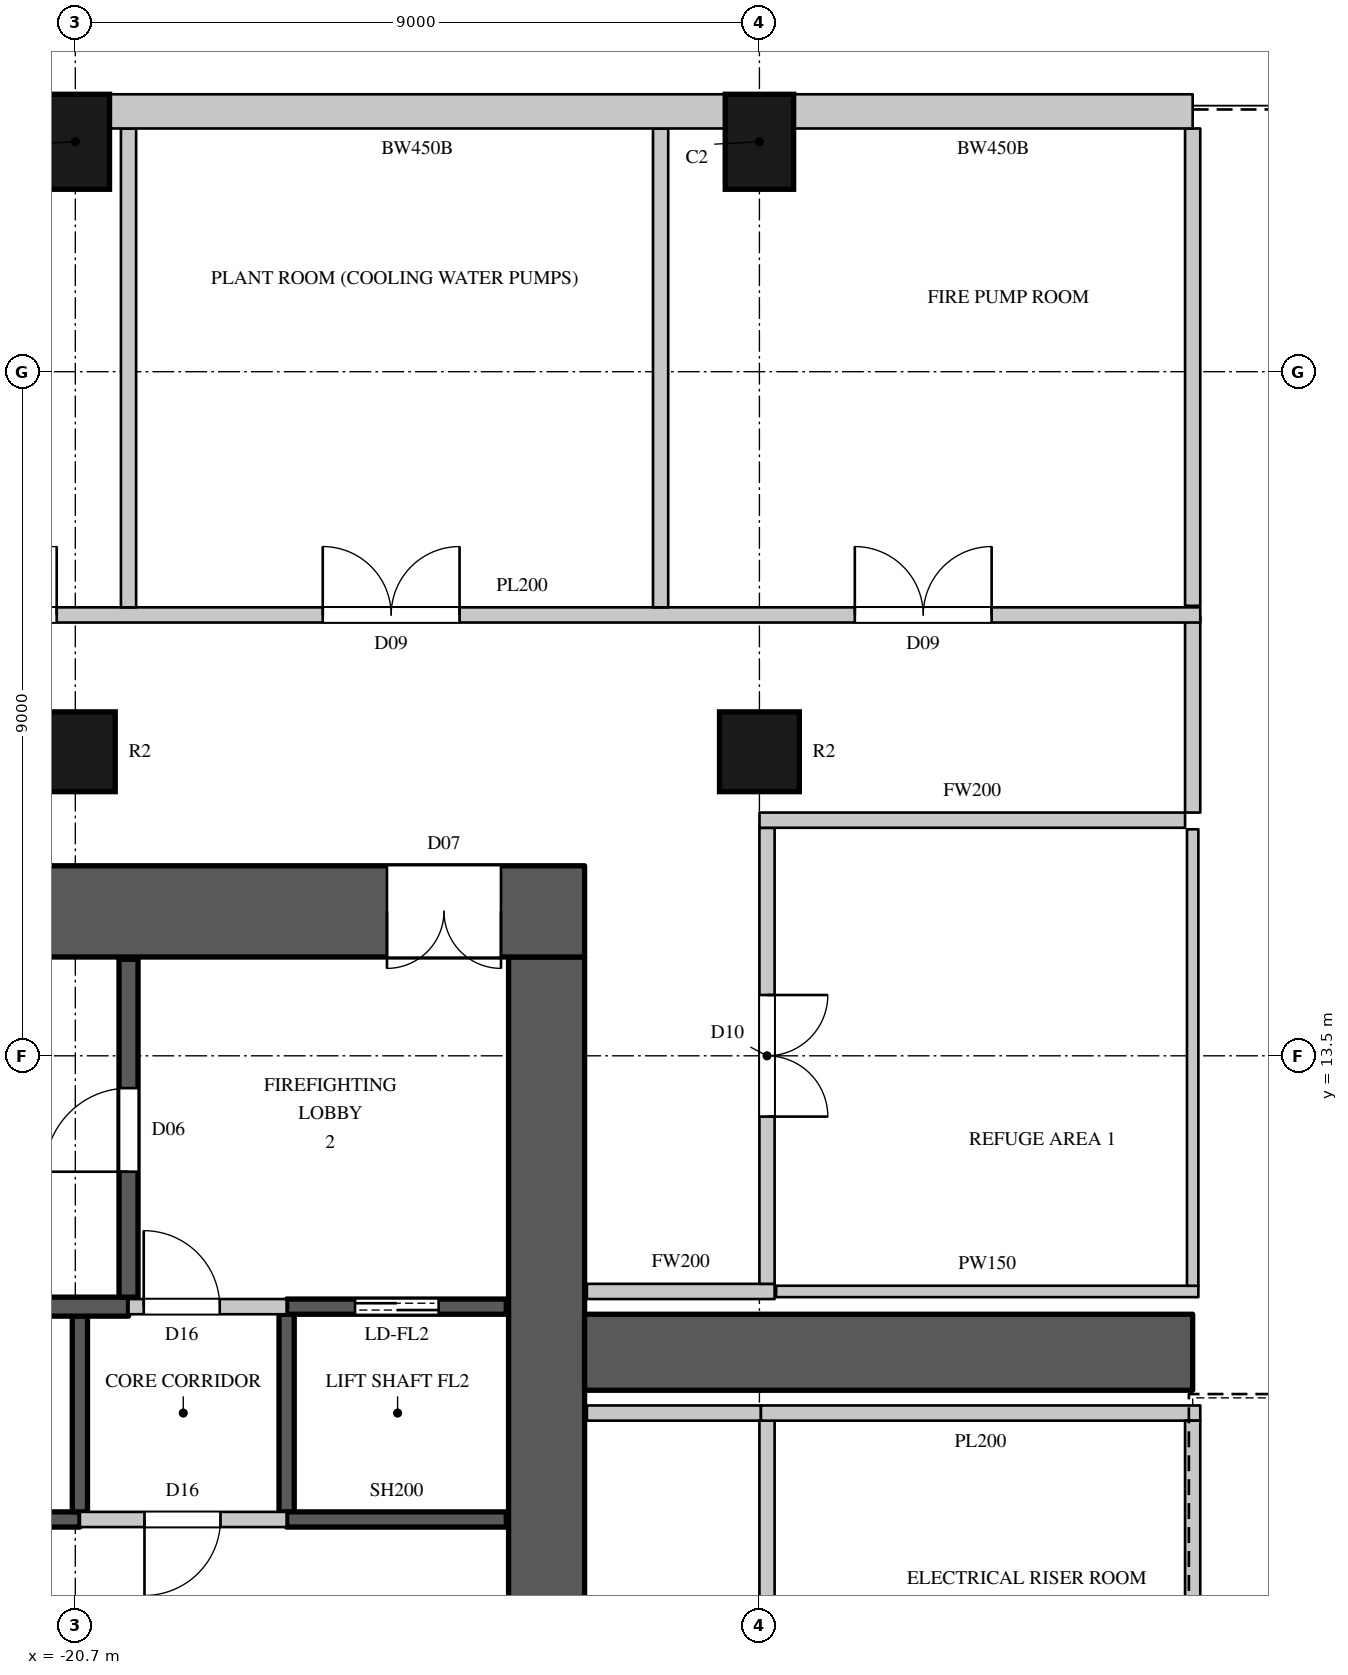
"""IFC4 building model, lengths in metres.
Left out: names, types, materials, properties, quantities, classifications, styles, units other than length and angle.
Written with IfcOpenShell. Run it as: python <this file> out.ifc"""

import sys

from ifc_helpers import new_model, si_unit, direction, frame, frame_2d, origin, origin_2d, place, context, subcontext, project, spatial, rectangle, circle, extrude, element, fill, save


model = new_model("IFC4")
c1 = context("Model", 3, precision=1e-05, world=origin(), true_north=direction((0.0, 1.0)))
c2 = subcontext(c1, "Body", "Model", "MODEL_VIEW")
j1 = project(units=[si_unit("LENGTHUNIT", "METRE"), si_unit("PLANEANGLEUNIT", "RADIAN")], contexts=[c1])
p1 = place(None, origin())
s1 = spatial("IfcSite", under=j1, at=p1, CompositionType="ELEMENT")
p2 = place(p1, origin())
s2 = spatial("IfcBuilding", under=s1, at=p2, CompositionType="ELEMENT")
p3 = place(p2, frame((0.0, 0.0, 152.5)))
s3 = spatial("IfcBuildingStorey", under=s2, at=p3, CompositionType="ELEMENT", Elevation=152.5)
for number, where, z_axis, x_axis in (
    (1, (-11.7, 25.525, 0.0), (0.0, 0.0, 1.0), (-1.0, 0.0, 0.0)),
    (2, (-20.7, 25.525, 0.0), (0.0, 0.0, 1.0), (-1.0, 0.0, 0.0)),
):
    element("IfcColumn", number, at=place(p3, frame(where, z_axis=z_axis, x_axis=x_axis)), inside=s3, PredefinedType="COLUMN", context=c2, shape_type="SweptSolid", body=[
        extrude(rectangle(XDim=0.9, YDim=1.25, at=origin_2d()), origin(), (0.0, 0.0, 1.0), 8.0),
    ])
for number, where, z_axis, x_axis in (
    (3, (-20.7, 17.5, 0.0), (0.0, 0.0, 1.0), (1.0, 0.0, 0.0)),
    (4, (-11.7, 17.5, 0.0), (0.0, 0.0, 1.0), (1.0, 0.0, 0.0)),
):
    element("IfcColumn", number, at=place(p3, frame(where, z_axis=z_axis, x_axis=x_axis)), inside=s3, PredefinedType="COLUMN", context=c2, shape_type="SweptSolid", body=[
        extrude(circle(Radius=0.525, at=origin_2d()), origin(), (0.0, 0.0, 1.0), 8.0),
    ])
p4 = place(p3, frame((-14.0, 9.6, 0.0), z_axis=(0.0, 0.0, 1.0), x_axis=(1.0, 0.0, 0.0)))
e5 = element("IfcWall", 5, at=p4, inside=s3, PredefinedType="SOLIDWALL", context=c2, shape_type="SweptSolid", body=[
    extrude(rectangle(XDim=8.0, YDim=1.0, at=frame_2d((4.0, 0.0))), origin(), (0.0, 0.0, 1.0), 7.7),
])
p5 = place(p3, frame((-6.0, 25.925, 0.0), z_axis=(0.0, 0.0, 1.0), x_axis=(-1.0, 0.0, 0.0)))
e6 = element("IfcWall", 6, at=p5, inside=s3, PredefinedType="SOLIDWALL", context=c2, shape_type="SweptSolid", body=[
    extrude(rectangle(XDim=5.25, YDim=0.45, at=frame_2d((2.625, 0.0))), origin(), (0.0, 0.0, 1.0), 4.7),
])
p6 = place(p3, frame((-12.15, 25.925, 0.0), z_axis=(0.0, 0.0, 1.0), x_axis=(-1.0, 0.0, 0.0)))
e7 = element("IfcWall", 7, at=p6, inside=s3, PredefinedType="SOLIDWALL", context=c2, shape_type="SweptSolid", body=[
    extrude(rectangle(XDim=8.1, YDim=0.45, at=frame_2d((4.05, 0.0))), origin(), (0.0, 0.0, 1.0), 7.7),
])
p7 = place(p3, frame((-30.0, 15.4, 0.0), z_axis=(0.0, 0.0, 1.0), x_axis=(1.0, 0.0, 0.0)))
e8 = element("IfcWall", 8, at=p7, inside=s3, PredefinedType="SHEAR", context=c2, shape_type="SweptSolid", body=[
    extrude(rectangle(XDim=16.0, YDim=1.2, at=frame_2d((8.0, 0.0))), origin(), (0.0, 0.0, 1.0), 8.0),
])
p8 = place(p7, frame((13.4, 0.0, 0.0)))
e9 = element("IfcOpeningElement", 9, at=p8, cuts=e8, PredefinedType="OPENING", context=c2, shape_type="SweptSolid", body=[
    extrude(rectangle(XDim=1.5, YDim=2.4, at=frame_2d((0.75, 1.2))), frame((0.0, 0.61, 0.0), z_axis=(0.0, -1.0, 0.0), x_axis=(1.0, 0.0, 0.0)), (0.0, 0.0, 1.0), 1.22),
])
p9 = place(p3, frame((-14.5, -14.8, 0.0), z_axis=(0.0, 0.0, 1.0), x_axis=(0.0, 1.0, 0.0)))
e10 = element("IfcWall", 10, at=p9, inside=s3, PredefinedType="SHEAR", context=c2, shape_type="SweptSolid", body=[
    extrude(rectangle(XDim=29.6, YDim=1.0, at=frame_2d((14.8, 0.0))), origin(), (0.0, 0.0, 1.0), 8.0),
])
p10 = place(p9, frame((8.45, 0.0, 0.0)))
e11 = element("IfcOpeningElement", 11, at=p10, cuts=e10, PredefinedType="OPENING", context=c2, shape_type="SweptSolid", body=[
    extrude(rectangle(XDim=1.5, YDim=2.4, at=frame_2d((0.75, 1.2))), frame((0.0, 0.51, 0.0), z_axis=(0.0, -1.0, 0.0), x_axis=(1.0, 0.0, 0.0)), (0.0, 0.0, 1.0), 1.02),
])
p11 = place(p9, frame((19.65, 0.0, 0.0)))
e12 = element("IfcOpeningElement", 12, at=p11, cuts=e10, PredefinedType="OPENING", context=c2, shape_type="SweptSolid", body=[
    extrude(rectangle(XDim=1.5, YDim=2.4, at=frame_2d((0.75, 1.2))), frame((0.0, 0.51, 0.0), z_axis=(0.0, -1.0, 0.0), x_axis=(1.0, 0.0, 0.0)), (0.0, 0.0, 1.0), 1.02),
])
p12 = place(p9, frame((14.5, 0.0, 0.0)))
e13 = element("IfcOpeningElement", 13, at=p12, cuts=e10, PredefinedType="OPENING", context=c2, shape_type="SweptSolid", body=[
    extrude(rectangle(XDim=0.6, YDim=2.0, at=frame_2d((0.3, 1.0))), frame((0.0, 0.51, 0.0), z_axis=(0.0, -1.0, 0.0), x_axis=(1.0, 0.0, 0.0)), (0.0, 0.0, 1.0), 1.02),
])
p13 = place(p3, frame((-20.64, 7.4, 0.0), z_axis=(0.0, 0.0, 1.0), x_axis=(1.0, 0.0, 0.0)))
e14 = element("IfcWall", 14, at=p13, inside=s3, PredefinedType="PARTITIONING", context=c2, shape_type="SweptSolid", body=[
    extrude(rectangle(XDim=2.72, YDim=0.2, at=frame_2d((1.36, 0.0))), origin(), (0.0, 0.0, 1.0), 7.7),
])
p14 = place(p13, frame((0.85, 0.0, 0.0)))
e15 = element("IfcOpeningElement", 15, at=p14, cuts=e14, PredefinedType="OPENING", context=c2, shape_type="SweptSolid", body=[
    extrude(rectangle(XDim=1.0, YDim=2.2, at=frame_2d((0.5, 1.1))), frame((0.0, 0.11, 0.0), z_axis=(0.0, -1.0, 0.0), x_axis=(1.0, 0.0, 0.0)), (0.0, 0.0, 1.0), 0.22),
])
p15 = place(p3, frame((-20.0, 10.2, 0.0), z_axis=(0.0, 0.0, 1.0), x_axis=(1.0, 0.0, 0.0)))
e16 = element("IfcWall", 16, at=p15, inside=s3, PredefinedType="PARTITIONING", context=c2, shape_type="SweptSolid", body=[
    extrude(rectangle(XDim=2.08, YDim=0.2, at=frame_2d((1.04, 0.0))), origin(), (0.0, 0.0, 1.0), 7.7),
])
p16 = place(p15, frame((0.2, 0.0, 0.0)))
e17 = element("IfcOpeningElement", 17, at=p16, cuts=e16, PredefinedType="OPENING", context=c2, shape_type="SweptSolid", body=[
    extrude(rectangle(XDim=1.0, YDim=2.2, at=frame_2d((0.5, 1.1))), frame((0.0, 0.11, 0.0), z_axis=(0.0, -1.0, 0.0), x_axis=(1.0, 0.0, 0.0)), (0.0, 0.0, 1.0), 0.22),
])
p17 = place(p3, frame((-13.97, 8.8, 0.0), z_axis=(0.0, 0.0, 1.0), x_axis=(1.0, 0.0, 0.0)))
e18 = element("IfcWall", 18, at=p17, inside=s3, PredefinedType="PARTITIONING", context=c2, shape_type="SweptSolid", body=[
    extrude(rectangle(XDim=2.29, YDim=0.2, at=frame_2d((1.145, 0.0))), origin(), (0.0, 0.0, 1.0), 7.7),
])
p18 = place(p3, frame((-13.97, 10.4, 0.0), z_axis=(0.0, 0.0, 1.0), x_axis=(1.0, 0.0, 0.0)))
e19 = element("IfcWall", 19, at=p18, inside=s3, PredefinedType="PARTITIONING", context=c2, shape_type="SweptSolid", body=[
    extrude(rectangle(XDim=2.47, YDim=0.2, at=frame_2d((1.235, 0.0))), origin(), (0.0, 0.0, 1.0), 7.7),
])
p19 = place(p3, frame((-11.6, 10.5, 0.0), z_axis=(0.0, 0.0, 1.0), x_axis=(0.0, 1.0, 0.0)))
e20 = element("IfcWall", 20, at=p19, inside=s3, PredefinedType="PARTITIONING", context=c2, shape_type="SweptSolid", body=[
    extrude(rectangle(XDim=5.999, YDim=0.2, at=frame_2d((3.0, 0.0))), origin(), (0.0, 0.0, 1.0), 7.15),
])
p20 = place(p19, frame((2.2, 0.0, 0.0)))
e21 = element("IfcOpeningElement", 21, at=p20, cuts=e20, PredefinedType="OPENING", context=c2, shape_type="SweptSolid", body=[
    extrude(rectangle(XDim=1.6, YDim=2.4, at=frame_2d((0.8, 1.2))), frame((0.0, 0.11, 0.0), z_axis=(0.0, -1.0, 0.0), x_axis=(1.0, 0.0, 0.0)), (0.0, 0.0, 1.0), 0.22),
])
p21 = place(p3, frame((-11.699, 16.6, 0.0), z_axis=(0.0, 0.0, 1.0), x_axis=(1.0, 0.0, 0.0)))
e22 = element("IfcWall", 22, at=p21, inside=s3, PredefinedType="PARTITIONING", context=c2, shape_type="SweptSolid", body=[
    extrude(rectangle(XDim=5.599, YDim=0.2, at=frame_2d((2.799, 0.0))), origin(), (0.0, 0.0, 1.0), 5.85),
])
p22 = place(p3, frame((-6.0, 16.7, 0.0), z_axis=(0.0, 0.0, 1.0), x_axis=(0.0, 1.0, 0.0)))
e23 = element("IfcWall", 23, at=p22, inside=s3, PredefinedType="PARTITIONING", context=c2, shape_type="SweptSolid", body=[
    extrude(rectangle(XDim=2.58, YDim=0.2, at=frame_2d((1.29, 0.0))), origin(), (0.0, 0.0, 1.0), 7.7),
])
p23 = place(p3, frame((-11.48, 10.4, 0.0), z_axis=(0.0, 0.0, 1.0), x_axis=(1.0, 0.0, 0.0)))
e24 = element("IfcWall", 24, at=p23, inside=s3, PredefinedType="PARTITIONING", context=c2, shape_type="SweptSolid", body=[
    extrude(rectangle(XDim=5.555, YDim=0.15, at=frame_2d((2.777, 0.0))), origin(), (0.0, 0.0, 1.0), 7.7),
])
p24 = place(p3, frame((-6.0, 10.475, 0.0), z_axis=(0.0, 0.0, 1.0), x_axis=(0.0, 1.0, 0.0)))
e25 = element("IfcWall", 25, at=p24, inside=s3, PredefinedType="PARTITIONING", context=c2, shape_type="SweptSolid", body=[
    extrude(rectangle(XDim=6.005, YDim=0.15, at=frame_2d((3.002, 0.0))), origin(), (0.0, 0.0, 1.0), 7.7),
])
p25 = place(p3, frame((-23.745, 19.3, 0.0), z_axis=(0.0, 0.0, 1.0), x_axis=(1.0, 0.0, 0.0)))
e26 = element("IfcWall", 26, at=p25, inside=s3, PredefinedType="PARTITIONING", context=c2, shape_type="SweptSolid", body=[
    extrude(rectangle(XDim=17.845, YDim=0.2, at=frame_2d((8.922, 0.0))), origin(), (0.0, 0.0, 1.0), 7.7),
])
p26 = place(p25, frame((1.0, 0.0, 0.0)))
e27 = element("IfcOpeningElement", 27, at=p26, cuts=e26, PredefinedType="OPENING", context=c2, shape_type="SweptSolid", body=[
    extrude(rectangle(XDim=1.8, YDim=2.4, at=frame_2d((0.9, 1.2))), frame((0.0, 0.11, 0.0), z_axis=(0.0, -1.0, 0.0), x_axis=(1.0, 0.0, 0.0)), (0.0, 0.0, 1.0), 0.22),
])
p27 = place(p25, frame((6.3, 0.0, 0.0)))
e28 = element("IfcOpeningElement", 28, at=p27, cuts=e26, PredefinedType="OPENING", context=c2, shape_type="SweptSolid", body=[
    extrude(rectangle(XDim=1.8, YDim=2.4, at=frame_2d((0.9, 1.2))), frame((0.0, 0.11, 0.0), z_axis=(0.0, -1.0, 0.0), x_axis=(1.0, 0.0, 0.0)), (0.0, 0.0, 1.0), 0.22),
])
p28 = place(p25, frame((13.3, 0.0, 0.0)))
e29 = element("IfcOpeningElement", 29, at=p28, cuts=e26, PredefinedType="OPENING", context=c2, shape_type="SweptSolid", body=[
    extrude(rectangle(XDim=1.8, YDim=2.4, at=frame_2d((0.9, 1.2))), frame((0.0, 0.11, 0.0), z_axis=(0.0, -1.0, 0.0), x_axis=(1.0, 0.0, 0.0)), (0.0, 0.0, 1.0), 0.22),
])
p29 = place(p3, frame((-20.0, 19.4, 0.0), z_axis=(0.0, 0.0, 1.0), x_axis=(0.0, 1.0, 0.0)))
e30 = element("IfcWall", 30, at=p29, inside=s3, PredefinedType="PARTITIONING", context=c2, shape_type="SweptSolid", body=[
    extrude(rectangle(XDim=6.3, YDim=0.2, at=frame_2d((3.15, 0.0))), origin(), (0.0, 0.0, 1.0), 6.4),
])
p30 = place(p3, frame((-13.0, 19.4, 0.0), z_axis=(0.0, 0.0, 1.0), x_axis=(0.0, 1.0, 0.0)))
e31 = element("IfcWall", 31, at=p30, inside=s3, PredefinedType="PARTITIONING", context=c2, shape_type="SweptSolid", body=[
    extrude(rectangle(XDim=6.3, YDim=0.2, at=frame_2d((3.15, 0.0))), origin(), (0.0, 0.0, 1.0), 7.7),
])
p31 = place(p3, frame((-11.6, -8.7, 0.0), z_axis=(0.0, 0.0, 1.0), x_axis=(0.0, 1.0, 0.0)))
e32 = element("IfcWall", 32, at=p31, inside=s3, PredefinedType="PARTITIONING", context=c2, shape_type="SweptSolid", body=[
    extrude(rectangle(XDim=17.4, YDim=0.2, at=frame_2d((8.7, 0.0))), origin(), (0.0, 0.0, 1.0), 7.15),
])
p32 = place(p31, frame((3.5, 0.0, 0.0)))
e33 = element("IfcOpeningElement", 33, at=p32, cuts=e32, PredefinedType="OPENING", context=c2, shape_type="SweptSolid", body=[
    extrude(rectangle(XDim=1.8, YDim=2.4, at=frame_2d((0.9, 1.2))), frame((0.0, 0.11, 0.0), z_axis=(0.0, -1.0, 0.0), x_axis=(1.0, 0.0, 0.0)), (0.0, 0.0, 1.0), 0.22),
])
p33 = place(p31, frame((12.05, 0.0, 0.0)))
e34 = element("IfcOpeningElement", 34, at=p33, cuts=e32, PredefinedType="OPENING", context=c2, shape_type="SweptSolid", body=[
    extrude(rectangle(XDim=1.8, YDim=2.4, at=frame_2d((0.9, 1.2))), frame((0.0, 0.11, 0.0), z_axis=(0.0, -1.0, 0.0), x_axis=(1.0, 0.0, 0.0)), (0.0, 0.0, 1.0), 0.22),
])
p34 = place(p3, frame((-11.68, 8.8, 0.0), z_axis=(0.0, 0.0, 1.0), x_axis=(1.0, 0.0, 0.0)))
e35 = element("IfcWall", 35, at=p34, inside=s3, PredefinedType="PARTITIONING", context=c2, shape_type="SweptSolid", body=[
    extrude(rectangle(XDim=5.78, YDim=0.2, at=frame_2d((2.89, 0.0))), origin(), (0.0, 0.0, 1.0), 7.7),
])
p35 = place(p3, frame((-6.0, 0.02, 0.0), z_axis=(0.0, 0.0, 1.0), x_axis=(0.0, 1.0, 0.0)))
e36 = element("IfcWall", 36, at=p35, inside=s3, PredefinedType="PARTITIONING", context=c2, shape_type="SweptSolid", body=[
    extrude(rectangle(XDim=8.68, YDim=0.2, at=frame_2d((4.34, 0.0))), origin(), (0.0, 0.0, 1.0), 7.7),
])
p36 = place(p3, frame((-6.0, 19.42, 0.0), z_axis=(0.0, 0.0, 1.0), x_axis=(0.0, 1.0, 0.0)))
e37 = element("IfcWall", 37, at=p36, inside=s3, PredefinedType="PARTITIONING", context=c2, shape_type="SweptSolid", body=[
    extrude(rectangle(XDim=6.28, YDim=0.2, at=frame_2d((3.14, 0.0))), origin(), (0.0, 0.0, 1.0), 7.7),
])
p37 = place(p3, frame((-28.97, 7.4, 0.0), z_axis=(0.0, 0.0, 1.0), x_axis=(1.0, 0.0, 0.0)))
e38 = element("IfcWall", 38, at=p37, inside=s3, PredefinedType="SHEAR", context=c2, shape_type="SweptSolid", body=[
    extrude(rectangle(XDim=8.33, YDim=0.2, at=frame_2d((4.165, 0.0))), origin(), (0.0, 0.0, 1.0), 7.7),
])
p38 = place(p3, frame((-20.64, 7.5, 0.0), z_axis=(0.0, 0.0, 1.0), x_axis=(0.0, 1.0, 0.0)))
e39 = element("IfcWall", 39, at=p38, inside=s3, PredefinedType="SHEAR", context=c2, shape_type="SweptSolid", body=[
    extrude(rectangle(XDim=2.575, YDim=0.2, at=frame_2d((1.288, 0.0))), origin(), (0.0, 0.0, 1.0), 7.7),
])
p39 = place(p3, frame((-17.92, 7.5, 0.0), z_axis=(0.0, 0.0, 1.0), x_axis=(0.0, 1.0, 0.0)))
e40 = element("IfcWall", 40, at=p39, inside=s3, PredefinedType="SHEAR", context=c2, shape_type="SweptSolid", body=[
    extrude(rectangle(XDim=2.6, YDim=0.2, at=frame_2d((1.3, 0.0))), origin(), (0.0, 0.0, 1.0), 7.7),
])
p40 = place(p3, frame((-17.92, 7.4, 0.0), z_axis=(0.0, 0.0, 1.0), x_axis=(1.0, 0.0, 0.0)))
e41 = element("IfcWall", 41, at=p40, inside=s3, PredefinedType="SHEAR", context=c2, shape_type="SweptSolid", body=[
    extrude(rectangle(XDim=2.89, YDim=0.2, at=frame_2d((1.445, 0.0))), origin(), (0.0, 0.0, 1.0), 7.7),
])
p41 = place(p3, frame((-17.92, 10.2, 0.0), z_axis=(0.0, 0.0, 1.0), x_axis=(1.0, 0.0, 0.0)))
e42 = element("IfcWall", 42, at=p41, inside=s3, PredefinedType="SHEAR", context=c2, shape_type="SweptSolid", body=[
    extrude(rectangle(XDim=2.89, YDim=0.2, at=frame_2d((1.445, 0.0))), origin(), (0.0, 0.0, 1.0), 7.7),
])
p42 = place(p41, frame((0.9, 0.0, 0.0)))
e43 = element("IfcOpeningElement", 43, at=p42, cuts=e42, PredefinedType="OPENING", context=c2, shape_type="SweptSolid", body=[
    extrude(rectangle(XDim=1.1, YDim=2.2, at=frame_2d((0.55, 1.1))), frame((0.0, 0.11, 0.0), z_axis=(0.0, -1.0, 0.0), x_axis=(1.0, 0.0, 0.0)), (0.0, 0.0, 1.0), 0.22),
])
p43 = place(p3, frame((-28.81, 10.2, 0.0), z_axis=(0.0, 0.0, 1.0), x_axis=(1.0, 0.0, 0.0)))
e44 = element("IfcWall", 44, at=p43, inside=s3, PredefinedType="SHEAR", context=c2, shape_type="SweptSolid", body=[
    extrude(rectangle(XDim=8.81, YDim=0.25, at=frame_2d((4.405, 0.0))), origin(), (0.0, 0.0, 1.0), 7.7),
])
p44 = place(p3, frame((-20.0, 10.325, 0.0), z_axis=(0.0, 0.0, 1.0), x_axis=(0.0, 1.0, 0.0)))
e45 = element("IfcWall", 45, at=p44, inside=s3, PredefinedType="SHEAR", context=c2, shape_type="SweptSolid", body=[
    extrude(rectangle(XDim=4.445, YDim=0.25, at=frame_2d((2.223, 0.0))), origin(), (0.0, 0.0, 1.0), 7.7),
])
p45 = place(p44, frame((1.65, 0.0, 0.0)))
e46 = element("IfcOpeningElement", 46, at=p45, cuts=e45, PredefinedType="OPENING", context=c2, shape_type="SweptSolid", body=[
    extrude(rectangle(XDim=1.1, YDim=2.2, at=frame_2d((0.55, 1.1))), frame((0.0, 0.135, 0.0), z_axis=(0.0, -1.0, 0.0), x_axis=(1.0, 0.0, 0.0)), (0.0, 0.0, 1.0), 0.27),
])
p46 = place(p45, origin())
e47 = element("IfcDoor", 47, at=p46, inside=s3, OperationType="SINGLE_SWING_LEFT", PredefinedType="DOOR", context=c2, shape_type="SweptSolid", body=[
    extrude(rectangle(XDim=1.1, YDim=2.2, at=frame_2d((0.55, 1.1))), frame((0.0, 0.025, 0.0), z_axis=(0.0, -1.0, 0.0), x_axis=(1.0, 0.0, 0.0)), (0.0, 0.0, 1.0), 0.05),
])
fill(e46, e47)
p47 = place(p14, origin())
e48 = element("IfcDoor", 48, at=p47, inside=s3, OperationType="SINGLE_SWING_RIGHT", PredefinedType="DOOR", context=c2, shape_type="SweptSolid", body=[
    extrude(rectangle(XDim=1.0, YDim=2.2, at=frame_2d((0.5, 1.1))), frame((0.0, 0.025, 0.0), z_axis=(0.0, -1.0, 0.0), x_axis=(1.0, 0.0, 0.0)), (0.0, 0.0, 1.0), 0.05),
])
fill(e15, e48)
p48 = place(p16, origin())
e49 = element("IfcDoor", 49, at=p48, inside=s3, OperationType="SINGLE_SWING_LEFT", PredefinedType="DOOR", context=c2, shape_type="SweptSolid", body=[
    extrude(rectangle(XDim=1.0, YDim=2.2, at=frame_2d((0.5, 1.1))), frame((0.0, 0.025, 0.0), z_axis=(0.0, -1.0, 0.0), x_axis=(1.0, 0.0, 0.0)), (0.0, 0.0, 1.0), 0.05),
])
fill(e17, e49)
p49 = place(p42, origin())
e50 = element("IfcDoor", 50, at=p49, inside=s3, OperationType="DOUBLE_DOOR_SLIDING", PredefinedType="DOOR", context=c2, shape_type="SweptSolid", body=[
    extrude(rectangle(XDim=1.1, YDim=2.2, at=frame_2d((0.55, 1.1))), frame((0.0, 0.025, 0.0), z_axis=(0.0, -1.0, 0.0), x_axis=(1.0, 0.0, 0.0)), (0.0, 0.0, 1.0), 0.05),
])
fill(e43, e50)
p50 = place(p26, origin())
e51 = element("IfcDoor", 51, at=p50, inside=s3, OperationType="DOUBLE_DOOR_SINGLE_SWING", PredefinedType="DOOR", context=c2, shape_type="SweptSolid", body=[
    extrude(rectangle(XDim=1.8, YDim=2.4, at=frame_2d((0.9, 1.2))), frame((0.0, 0.025, 0.0), z_axis=(0.0, -1.0, 0.0), x_axis=(1.0, 0.0, 0.0)), (0.0, 0.0, 1.0), 0.05),
])
fill(e27, e51)
p51 = place(p27, origin())
e52 = element("IfcDoor", 52, at=p51, inside=s3, OperationType="DOUBLE_DOOR_SINGLE_SWING", PredefinedType="DOOR", context=c2, shape_type="SweptSolid", body=[
    extrude(rectangle(XDim=1.8, YDim=2.4, at=frame_2d((0.9, 1.2))), frame((0.0, 0.025, 0.0), z_axis=(0.0, -1.0, 0.0), x_axis=(1.0, 0.0, 0.0)), (0.0, 0.0, 1.0), 0.05),
])
fill(e28, e52)
p52 = place(p28, origin())
e53 = element("IfcDoor", 53, at=p52, inside=s3, OperationType="DOUBLE_DOOR_SINGLE_SWING", PredefinedType="DOOR", context=c2, shape_type="SweptSolid", body=[
    extrude(rectangle(XDim=1.8, YDim=2.4, at=frame_2d((0.9, 1.2))), frame((0.0, 0.025, 0.0), z_axis=(0.0, -1.0, 0.0), x_axis=(1.0, 0.0, 0.0)), (0.0, 0.0, 1.0), 0.05),
])
fill(e29, e53)
p53 = place(p20, origin())
e54 = element("IfcDoor", 54, at=p53, inside=s3, OperationType="DOUBLE_DOOR_SINGLE_SWING", PredefinedType="DOOR", context=c2, shape_type="SweptSolid", body=[
    extrude(rectangle(XDim=1.6, YDim=2.4, at=frame_2d((0.8, 1.2))), frame((0.0, 0.025, 0.0), z_axis=(0.0, -1.0, 0.0), x_axis=(1.0, 0.0, 0.0)), (0.0, 0.0, 1.0), 0.05),
])
fill(e21, e54)
p54 = place(p8, origin())
e55 = element("IfcDoor", 55, at=p54, inside=s3, OperationType="DOUBLE_DOOR_SINGLE_SWING", PredefinedType="DOOR", context=c2, shape_type="SweptSolid", body=[
    extrude(rectangle(XDim=1.5, YDim=2.4, at=frame_2d((0.75, 1.2))), frame((0.0, 0.025, 0.0), z_axis=(0.0, -1.0, 0.0), x_axis=(1.0, 0.0, 0.0)), (0.0, 0.0, 1.0), 0.05),
])
fill(e9, e55)
save(model, sys.argv[1])
